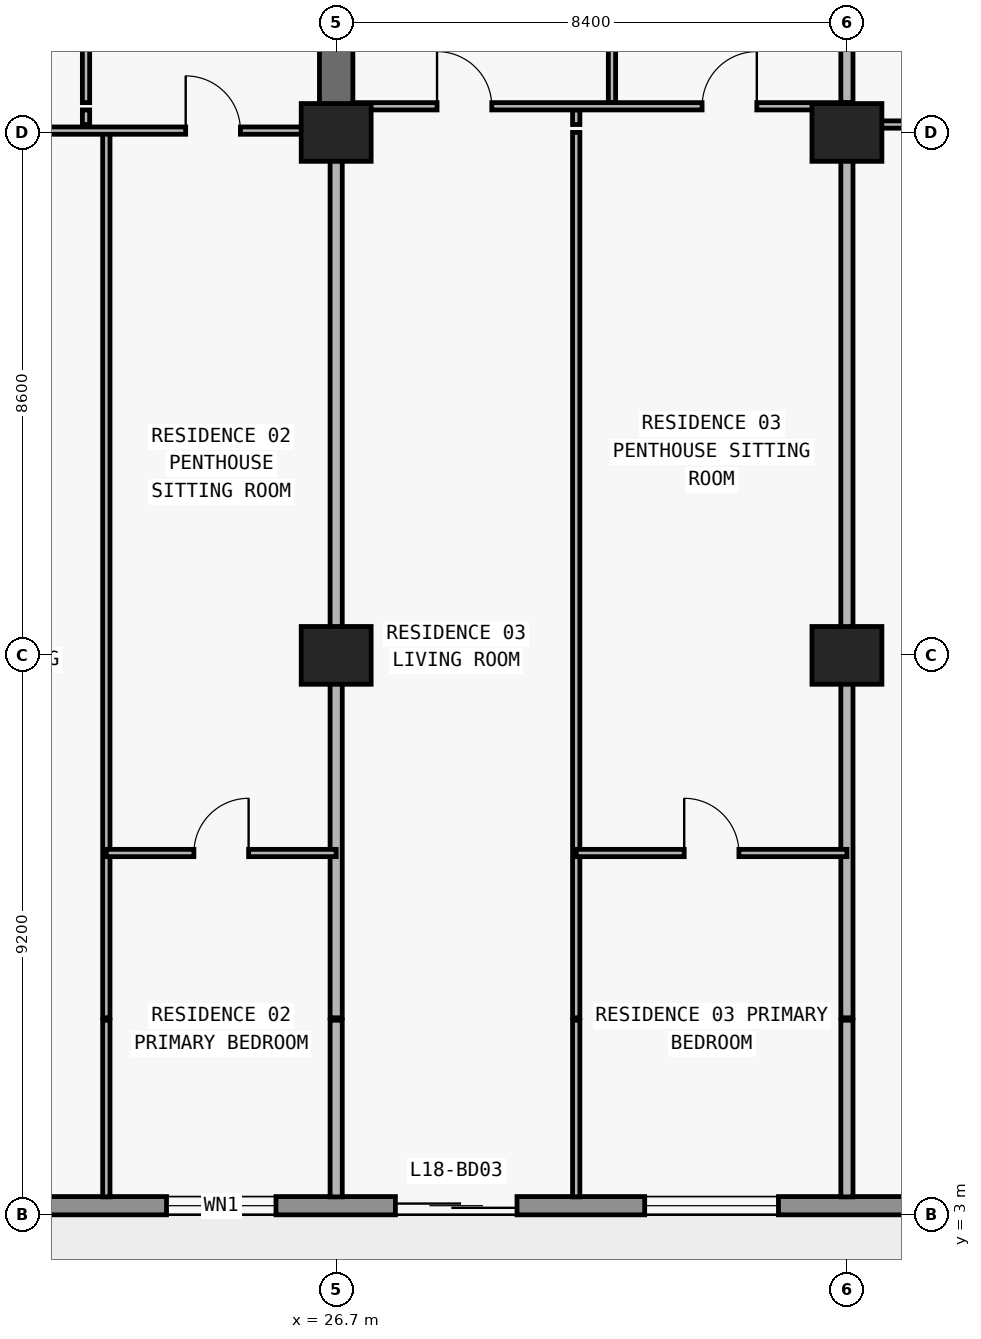
"""IFC4 building model, lengths in metres.
Left out: names, types, materials, properties, quantities, classifications, styles, units other than length and angle.
Written with IfcOpenShell. Run it as: python <this file> out.ifc"""

import sys

from ifc_helpers import new_model, si_unit, direction, frame, frame_2d, origin, origin_2d, place, context, subcontext, project, spatial, rectangle, extrude, element, fill, save


model = new_model("IFC4")
c1 = context("Model", 3, precision=1e-05, world=origin(), true_north=direction((0.0, 1.0)))
c2 = subcontext(c1, "Body", "Model", "MODEL_VIEW")
j1 = project(units=[si_unit("LENGTHUNIT", "METRE"), si_unit("PLANEANGLEUNIT", "RADIAN")], contexts=[c1])
p1 = place(None, origin())
s1 = spatial("IfcSite", under=j1, at=p1, CompositionType="ELEMENT")
p2 = place(p1, origin())
s2 = spatial("IfcBuilding", under=s1, at=p2, CompositionType="ELEMENT")
p3 = place(p2, frame((0.0, 0.0, 69.6)))
s3 = spatial("IfcBuildingStorey", under=s2, at=p3, CompositionType="ELEMENT", Elevation=69.6)
for number, where, z_axis, x_axis in (
    (1, (26.7, 12.2, 0.0), (0.0, 0.0, 1.0), (1.0, 0.0, 0.0)),
    (2, (35.1, 12.2, 0.0), (0.0, 0.0, 1.0), (1.0, 0.0, 0.0)),
    (3, (26.7, 20.8, 0.0), (0.0, 0.0, 1.0), (1.0, 0.0, 0.0)),
    (4, (35.1, 20.8, 0.0), (0.0, 0.0, 1.0), (1.0, 0.0, 0.0)),
):
    element("IfcColumn", number, at=place(p3, frame(where, z_axis=z_axis, x_axis=x_axis)), inside=s3, PredefinedType="COLUMN", context=c2, shape_type="SweptSolid", body=[
        extrude(rectangle(XDim=1.15, YDim=0.95, at=origin_2d()), origin(), (0.0, 0.0, 1.0), 3.05),
    ])
p4 = place(p3, frame((26.7, 20.8, 0.0), z_axis=(0.0, 0.0, 1.0), x_axis=(0.0, 1.0, 0.0)))
e5 = element("IfcWall", 5, at=p4, inside=s3, PredefinedType="SHEAR", context=c2, shape_type="SweptSolid", body=[
    extrude(rectangle(XDim=8.6, YDim=0.55, at=frame_2d((4.3, 0.0))), origin(), (0.0, 0.0, 1.0), 3.05),
])
p5 = place(p3, frame((72.7, 3.15, 0.0), z_axis=(0.0, 0.0, 1.0), x_axis=(-1.0, 0.0, 0.0)))
e6 = element("IfcWall", 6, at=p5, inside=s3, PredefinedType="STANDARD", context=c2, shape_type="SweptSolid", body=[
    extrude(rectangle(XDim=67.6, YDim=0.3, at=frame_2d((33.8, 0.0))), origin(), (0.0, 0.0, 1.0), 3.05),
])
p6 = place(p5, frame((59.826, 0.0, 0.0)))
e7 = element("IfcOpeningElement", 7, at=p6, cuts=e6, PredefinedType="OPENING", context=c2, shape_type="SweptSolid", body=[
    extrude(rectangle(XDim=2.0, YDim=2.3, at=frame_2d((1.0, 1.15))), frame((0.0, 0.16, 0.0), z_axis=(0.0, -1.0, 0.0), x_axis=(1.0, 0.0, 0.0)), (0.0, 0.0, 1.0), 0.32),
])
p7 = place(p5, frame((55.526, 0.0, 0.85)))
e8 = element("IfcOpeningElement", 8, at=p7, cuts=e6, PredefinedType="OPENING", context=c2, shape_type="SweptSolid", body=[
    extrude(rectangle(XDim=2.2, YDim=1.55, at=frame_2d((1.1, 0.775))), frame((0.0, 0.16, 0.0), z_axis=(0.0, -1.0, 0.0), x_axis=(1.0, 0.0, 0.0)), (0.0, 0.0, 1.0), 0.32),
])
p8 = place(p5, frame((51.09, 0.0, 0.0)))
e9 = element("IfcOpeningElement", 9, at=p8, cuts=e6, PredefinedType="OPENING", context=c2, shape_type="SweptSolid", body=[
    extrude(rectangle(XDim=2.0, YDim=2.3, at=frame_2d((1.0, 1.15))), frame((0.0, 0.16, 0.0), z_axis=(0.0, -1.0, 0.0), x_axis=(1.0, 0.0, 0.0)), (0.0, 0.0, 1.0), 0.32),
])
p9 = place(p5, frame((46.99, 0.0, 0.85)))
e10 = element("IfcOpeningElement", 10, at=p9, cuts=e6, PredefinedType="OPENING", context=c2, shape_type="SweptSolid", body=[
    extrude(rectangle(XDim=1.8, YDim=1.55, at=frame_2d((0.9, 0.775))), frame((0.0, 0.16, 0.0), z_axis=(0.0, -1.0, 0.0), x_axis=(1.0, 0.0, 0.0)), (0.0, 0.0, 1.0), 0.32),
])
p10 = place(p5, frame((43.026, 0.0, 0.0)))
e11 = element("IfcOpeningElement", 11, at=p10, cuts=e6, PredefinedType="OPENING", context=c2, shape_type="SweptSolid", body=[
    extrude(rectangle(XDim=2.0, YDim=2.3, at=frame_2d((1.0, 1.15))), frame((0.0, 0.16, 0.0), z_axis=(0.0, -1.0, 0.0), x_axis=(1.0, 0.0, 0.0)), (0.0, 0.0, 1.0), 0.32),
])
p11 = place(p5, frame((38.726, 0.0, 0.85)))
e12 = element("IfcOpeningElement", 12, at=p11, cuts=e6, PredefinedType="OPENING", context=c2, shape_type="SweptSolid", body=[
    extrude(rectangle(XDim=2.2, YDim=1.55, at=frame_2d((1.1, 0.775))), frame((0.0, 0.16, 0.0), z_axis=(0.0, -1.0, 0.0), x_axis=(1.0, 0.0, 0.0)), (0.0, 0.0, 1.0), 0.32),
])
p12 = place(p5, frame((34.51, 0.0, 0.0)))
e13 = element("IfcOpeningElement", 13, at=p12, cuts=e6, PredefinedType="OPENING", context=c2, shape_type="SweptSolid", body=[
    extrude(rectangle(XDim=2.0, YDim=2.3, at=frame_2d((1.0, 1.15))), frame((0.0, 0.16, 0.0), z_axis=(0.0, -1.0, 0.0), x_axis=(1.0, 0.0, 0.0)), (0.0, 0.0, 1.0), 0.32),
])
p13 = place(p5, frame((30.81, 0.0, 0.85)))
e14 = element("IfcOpeningElement", 14, at=p13, cuts=e6, PredefinedType="OPENING", context=c2, shape_type="SweptSolid", body=[
    extrude(rectangle(XDim=1.8, YDim=1.55, at=frame_2d((0.9, 0.775))), frame((0.0, 0.16, 0.0), z_axis=(0.0, -1.0, 0.0), x_axis=(1.0, 0.0, 0.0)), (0.0, 0.0, 1.0), 0.32),
])
p14 = place(p5, frame((27.026, 0.0, 0.0)))
e15 = element("IfcOpeningElement", 15, at=p14, cuts=e6, PredefinedType="OPENING", context=c2, shape_type="SweptSolid", body=[
    extrude(rectangle(XDim=2.0, YDim=2.3, at=frame_2d((1.0, 1.15))), frame((0.0, 0.16, 0.0), z_axis=(0.0, -1.0, 0.0), x_axis=(1.0, 0.0, 0.0)), (0.0, 0.0, 1.0), 0.32),
])
p15 = place(p5, frame((22.726, 0.0, 0.85)))
e16 = element("IfcOpeningElement", 16, at=p15, cuts=e6, PredefinedType="OPENING", context=c2, shape_type="SweptSolid", body=[
    extrude(rectangle(XDim=2.2, YDim=1.55, at=frame_2d((1.1, 0.775))), frame((0.0, 0.16, 0.0), z_axis=(0.0, -1.0, 0.0), x_axis=(1.0, 0.0, 0.0)), (0.0, 0.0, 1.0), 0.32),
])
p16 = place(p5, frame((18.29, 0.0, 0.0)))
e17 = element("IfcOpeningElement", 17, at=p16, cuts=e6, PredefinedType="OPENING", context=c2, shape_type="SweptSolid", body=[
    extrude(rectangle(XDim=2.0, YDim=2.3, at=frame_2d((1.0, 1.15))), frame((0.0, 0.16, 0.0), z_axis=(0.0, -1.0, 0.0), x_axis=(1.0, 0.0, 0.0)), (0.0, 0.0, 1.0), 0.32),
])
p17 = place(p5, frame((14.19, 0.0, 0.85)))
e18 = element("IfcOpeningElement", 18, at=p17, cuts=e6, PredefinedType="OPENING", context=c2, shape_type="SweptSolid", body=[
    extrude(rectangle(XDim=1.8, YDim=1.55, at=frame_2d((0.9, 0.775))), frame((0.0, 0.16, 0.0), z_axis=(0.0, -1.0, 0.0), x_axis=(1.0, 0.0, 0.0)), (0.0, 0.0, 1.0), 0.32),
])
p18 = place(p5, frame((10.226, 0.0, 0.0)))
e19 = element("IfcOpeningElement", 19, at=p18, cuts=e6, PredefinedType="OPENING", context=c2, shape_type="SweptSolid", body=[
    extrude(rectangle(XDim=2.0, YDim=2.3, at=frame_2d((1.0, 1.15))), frame((0.0, 0.16, 0.0), z_axis=(0.0, -1.0, 0.0), x_axis=(1.0, 0.0, 0.0)), (0.0, 0.0, 1.0), 0.32),
])
p19 = place(p5, frame((5.926, 0.0, 0.85)))
e20 = element("IfcOpeningElement", 20, at=p19, cuts=e6, PredefinedType="OPENING", context=c2, shape_type="SweptSolid", body=[
    extrude(rectangle(XDim=2.2, YDim=1.55, at=frame_2d((1.1, 0.775))), frame((0.0, 0.16, 0.0), z_axis=(0.0, -1.0, 0.0), x_axis=(1.0, 0.0, 0.0)), (0.0, 0.0, 1.0), 0.32),
])
p20 = place(p3, frame((22.586, 20.93, 0.0), z_axis=(0.0, 0.0, 1.0), x_axis=(0.0, 1.0, 0.0)))
e21 = element("IfcWall", 21, at=p20, inside=s3, PredefinedType="PARTITIONING", context=c2, shape_type="SweptSolid", body=[
    extrude(rectangle(XDim=0.24, YDim=0.12, at=frame_2d((0.12, 0.0))), origin(), (0.0, 0.0, 1.0), 3.05),
])
p21 = place(p3, frame((22.586, 21.29, 0.0), z_axis=(0.0, 0.0, 1.0), x_axis=(0.0, 1.0, 0.0)))
e22 = element("IfcWall", 22, at=p21, inside=s3, PredefinedType="PARTITIONING", context=c2, shape_type="SweptSolid", body=[
    extrude(rectangle(XDim=4.69, YDim=0.12, at=frame_2d((2.345, 0.0))), origin(), (0.0, 0.0, 1.0), 3.05),
])
p22 = place(p21, frame((1.895, 0.0, 0.0)))
e23 = element("IfcOpeningElement", 23, at=p22, cuts=e22, PredefinedType="OPENING", context=c2, shape_type="SweptSolid", body=[
    extrude(rectangle(XDim=0.9, YDim=2.15, at=frame_2d((0.45, 1.075))), frame((0.0, 0.07, 0.0), z_axis=(0.0, -1.0, 0.0), x_axis=(1.0, 0.0, 0.0)), (0.0, 0.0, 1.0), 0.14),
])
p23 = place(p3, frame((22.92, 3.295, 0.0), z_axis=(0.0, 0.0, 1.0), x_axis=(0.0, 1.0, 0.0)))
e24 = element("IfcWall", 24, at=p23, inside=s3, PredefinedType="PARTITIONING", context=c2, shape_type="SweptSolid", body=[
    extrude(rectangle(XDim=2.905, YDim=0.12, at=frame_2d((1.453, 0.0))), origin(), (0.0, 0.0, 1.0), 3.05),
])
p24 = place(p3, frame((22.92, 6.24, 0.0), z_axis=(0.0, 0.0, 1.0), x_axis=(0.0, 1.0, 0.0)))
e25 = element("IfcWall", 25, at=p24, inside=s3, PredefinedType="PARTITIONING", context=c2, shape_type="SweptSolid", body=[
    extrude(rectangle(XDim=14.56, YDim=0.12, at=frame_2d((7.28, 0.0))), origin(), (0.0, 0.0, 1.0), 3.05),
])
p25 = place(p3, frame((26.7, 3.295, 0.0), z_axis=(0.0, 0.0, 1.0), x_axis=(0.0, 1.0, 0.0)))
e26 = element("IfcWall", 26, at=p25, inside=s3, PredefinedType="PARTITIONING", context=c2, shape_type="SweptSolid", body=[
    extrude(rectangle(XDim=2.905, YDim=0.2, at=frame_2d((1.453, 0.0))), origin(), (0.0, 0.0, 1.0), 3.05),
])
p26 = place(p3, frame((26.7, 6.24, 0.0), z_axis=(0.0, 0.0, 1.0), x_axis=(0.0, 1.0, 0.0)))
e27 = element("IfcWall", 27, at=p26, inside=s3, PredefinedType="PARTITIONING", context=c2, shape_type="SweptSolid", body=[
    extrude(rectangle(XDim=14.555, YDim=0.2, at=frame_2d((7.277, 0.0))), origin(), (0.0, 0.0, 1.0), 2.11),
])
p27 = place(p3, frame((30.648, 3.295, 0.0), z_axis=(0.0, 0.0, 1.0), x_axis=(0.0, 1.0, 0.0)))
e28 = element("IfcWall", 28, at=p27, inside=s3, PredefinedType="PARTITIONING", context=c2, shape_type="SweptSolid", body=[
    extrude(rectangle(XDim=2.905, YDim=0.12, at=frame_2d((1.453, 0.0))), origin(), (0.0, 0.0, 1.0), 3.05),
])
p28 = place(p3, frame((30.648, 6.24, 0.0), z_axis=(0.0, 0.0, 1.0), x_axis=(0.0, 1.0, 0.0)))
e29 = element("IfcWall", 29, at=p28, inside=s3, PredefinedType="PARTITIONING", context=c2, shape_type="SweptSolid", body=[
    extrude(rectangle(XDim=14.56, YDim=0.12, at=frame_2d((7.28, 0.0))), origin(), (0.0, 0.0, 1.0), 3.05),
])
p29 = place(p3, frame((30.648, 20.93, 0.0), z_axis=(0.0, 0.0, 1.0), x_axis=(0.0, 1.0, 0.0)))
e30 = element("IfcWall", 30, at=p29, inside=s3, PredefinedType="PARTITIONING", context=c2, shape_type="SweptSolid", body=[
    extrude(rectangle(XDim=0.24, YDim=0.12, at=frame_2d((0.12, 0.0))), origin(), (0.0, 0.0, 1.0), 3.05),
])
p30 = place(p3, frame((31.236, 21.29, 0.0), z_axis=(0.0, 0.0, 1.0), x_axis=(0.0, 1.0, 0.0)))
e31 = element("IfcWall", 31, at=p30, inside=s3, PredefinedType="PARTITIONING", context=c2, shape_type="SweptSolid", body=[
    extrude(rectangle(XDim=4.69, YDim=0.12, at=frame_2d((2.345, 0.0))), origin(), (0.0, 0.0, 1.0), 3.05),
])
p31 = place(p30, frame((1.895, 0.0, 0.0)))
e32 = element("IfcOpeningElement", 32, at=p31, cuts=e31, PredefinedType="OPENING", context=c2, shape_type="SweptSolid", body=[
    extrude(rectangle(XDim=0.9, YDim=2.15, at=frame_2d((0.45, 1.075))), frame((0.0, 0.07, 0.0), z_axis=(0.0, -1.0, 0.0), x_axis=(1.0, 0.0, 0.0)), (0.0, 0.0, 1.0), 0.14),
])
p32 = place(p3, frame((35.1, 3.295, 0.0), z_axis=(0.0, 0.0, 1.0), x_axis=(0.0, 1.0, 0.0)))
e33 = element("IfcWall", 33, at=p32, inside=s3, PredefinedType="PARTITIONING", context=c2, shape_type="SweptSolid", body=[
    extrude(rectangle(XDim=2.905, YDim=0.2, at=frame_2d((1.453, 0.0))), origin(), (0.0, 0.0, 1.0), 3.05),
])
p33 = place(p3, frame((35.1, 6.24, 0.0), z_axis=(0.0, 0.0, 1.0), x_axis=(0.0, 1.0, 0.0)))
e34 = element("IfcWall", 34, at=p33, inside=s3, PredefinedType="PARTITIONING", context=c2, shape_type="SweptSolid", body=[
    extrude(rectangle(XDim=14.56, YDim=0.2, at=frame_2d((7.28, 0.0))), origin(), (0.0, 0.0, 1.0), 2.11),
])
p34 = place(p3, frame((35.1, 20.93, 0.0), z_axis=(0.0, 0.0, 1.0), x_axis=(0.0, 1.0, 0.0)))
e35 = element("IfcWall", 35, at=p34, inside=s3, PredefinedType="PARTITIONING", context=c2, shape_type="SweptSolid", body=[
    extrude(rectangle(XDim=0.24, YDim=0.2, at=frame_2d((0.12, 0.0))), origin(), (0.0, 0.0, 1.0), 3.05),
])
p35 = place(p3, frame((35.1, 21.29, 0.0), z_axis=(0.0, 0.0, 1.0), x_axis=(0.0, 1.0, 0.0)))
e36 = element("IfcWall", 36, at=p35, inside=s3, PredefinedType="PARTITIONING", context=c2, shape_type="SweptSolid", body=[
    extrude(rectangle(XDim=4.69, YDim=0.2, at=frame_2d((2.345, 0.0))), origin(), (0.0, 0.0, 1.0), 2.11),
])
p36 = place(p3, frame((22.92, 8.95, 0.0), z_axis=(0.0, 0.0, 1.0), x_axis=(1.0, 0.0, 0.0)))
e37 = element("IfcWall", 37, at=p36, inside=s3, PredefinedType="PARTITIONING", context=c2, shape_type="SweptSolid", body=[
    extrude(rectangle(XDim=3.78, YDim=0.12, at=frame_2d((1.89, 0.0))), origin(), (0.0, 0.0, 1.0), 3.05),
])
p37 = place(p36, frame((1.44, 0.0, 0.0)))
e38 = element("IfcOpeningElement", 38, at=p37, cuts=e37, PredefinedType="OPENING", context=c2, shape_type="SweptSolid", body=[
    extrude(rectangle(XDim=0.9, YDim=2.15, at=frame_2d((0.45, 1.075))), frame((0.0, 0.07, 0.0), z_axis=(0.0, -1.0, 0.0), x_axis=(1.0, 0.0, 0.0)), (0.0, 0.0, 1.0), 0.14),
])
p38 = place(p3, frame((30.648, 8.95, 0.0), z_axis=(0.0, 0.0, 1.0), x_axis=(1.0, 0.0, 0.0)))
e39 = element("IfcWall", 39, at=p38, inside=s3, PredefinedType="PARTITIONING", context=c2, shape_type="SweptSolid", body=[
    extrude(rectangle(XDim=4.452, YDim=0.12, at=frame_2d((2.226, 0.0))), origin(), (0.0, 0.0, 1.0), 3.05),
])
p39 = place(p38, frame((1.776, 0.0, 0.0)))
e40 = element("IfcOpeningElement", 40, at=p39, cuts=e39, PredefinedType="OPENING", context=c2, shape_type="SweptSolid", body=[
    extrude(rectangle(XDim=0.9, YDim=2.15, at=frame_2d((0.45, 1.075))), frame((0.0, 0.07, 0.0), z_axis=(0.0, -1.0, 0.0), x_axis=(1.0, 0.0, 0.0)), (0.0, 0.0, 1.0), 0.14),
])
p40 = place(p3, frame((18.3, 20.83, 0.0), z_axis=(0.0, 0.0, 1.0), x_axis=(1.0, 0.0, 0.0)))
e41 = element("IfcWall", 41, at=p40, inside=s3, PredefinedType="PARTITIONING", context=c2, shape_type="SweptSolid", body=[
    extrude(rectangle(XDim=8.13, YDim=0.12, at=frame_2d((4.065, 0.0))), origin(), (0.0, 0.0, 1.0), 2.11),
])
p41 = place(p40, frame((1.693, 0.0, 0.0)))
e42 = element("IfcOpeningElement", 42, at=p41, cuts=e41, PredefinedType="OPENING", context=c2, shape_type="SweptSolid", body=[
    extrude(rectangle(XDim=0.9, YDim=2.06, at=frame_2d((0.45, 1.03))), frame((0.0, 0.07, 0.0), z_axis=(0.0, -1.0, 0.0), x_axis=(1.0, 0.0, 0.0)), (0.0, 0.0, 1.0), 0.14),
])
p42 = place(p40, frame((5.925, 0.0, 0.0)))
e43 = element("IfcOpeningElement", 43, at=p42, cuts=e41, PredefinedType="OPENING", context=c2, shape_type="SweptSolid", body=[
    extrude(rectangle(XDim=0.9, YDim=2.06, at=frame_2d((0.45, 1.03))), frame((0.0, 0.07, 0.0), z_axis=(0.0, -1.0, 0.0), x_axis=(1.0, 0.0, 0.0)), (0.0, 0.0, 1.0), 0.14),
])
p43 = place(p3, frame((35.1, 20.93, 0.0), z_axis=(0.0, 0.0, 1.0), x_axis=(1.0, 0.0, 0.0)))
e44 = element("IfcWall", 44, at=p43, inside=s3, PredefinedType="PARTITIONING", context=c2, shape_type="SweptSolid", body=[
    extrude(rectangle(XDim=7.6, YDim=0.12, at=frame_2d((3.8, 0.0))), origin(), (0.0, 0.0, 1.0), 2.11),
])
p44 = place(p43, frame((1.64, 0.0, 0.0)))
e45 = element("IfcOpeningElement", 45, at=p44, cuts=e44, PredefinedType="OPENING", context=c2, shape_type="SweptSolid", body=[
    extrude(rectangle(XDim=0.9, YDim=2.06, at=frame_2d((0.45, 1.03))), frame((0.0, 0.07, 0.0), z_axis=(0.0, -1.0, 0.0), x_axis=(1.0, 0.0, 0.0)), (0.0, 0.0, 1.0), 0.14),
])
p45 = place(p43, frame((5.527, 0.0, 0.0)))
e46 = element("IfcOpeningElement", 46, at=p45, cuts=e44, PredefinedType="OPENING", context=c2, shape_type="SweptSolid", body=[
    extrude(rectangle(XDim=0.9, YDim=2.06, at=frame_2d((0.45, 1.03))), frame((0.0, 0.07, 0.0), z_axis=(0.0, -1.0, 0.0), x_axis=(1.0, 0.0, 0.0)), (0.0, 0.0, 1.0), 0.14),
])
p46 = place(p3, frame((26.97, 21.23, 0.0), z_axis=(0.0, 0.0, 1.0), x_axis=(1.0, 0.0, 0.0)))
e47 = element("IfcWall", 47, at=p46, inside=s3, PredefinedType="PARTITIONING", context=c2, shape_type="SweptSolid", body=[
    extrude(rectangle(XDim=8.13, YDim=0.12, at=frame_2d((4.065, 0.0))), origin(), (0.0, 0.0, 1.0), 3.05),
])
p47 = place(p46, frame((1.389, 0.0, 0.0)))
e48 = element("IfcOpeningElement", 48, at=p47, cuts=e47, PredefinedType="OPENING", context=c2, shape_type="SweptSolid", body=[
    extrude(rectangle(XDim=0.9, YDim=2.15, at=frame_2d((0.45, 1.075))), frame((0.0, 0.07, 0.0), z_axis=(0.0, -1.0, 0.0), x_axis=(1.0, 0.0, 0.0)), (0.0, 0.0, 1.0), 0.14),
])
p48 = place(p46, frame((5.748, 0.0, 0.0)))
e49 = element("IfcOpeningElement", 49, at=p48, cuts=e47, PredefinedType="OPENING", context=c2, shape_type="SweptSolid", body=[
    extrude(rectangle(XDim=0.9, YDim=2.15, at=frame_2d((0.45, 1.075))), frame((0.0, 0.07, 0.0), z_axis=(0.0, -1.0, 0.0), x_axis=(1.0, 0.0, 0.0)), (0.0, 0.0, 1.0), 0.14),
])
p49 = place(p9, origin())
e50 = element("IfcWindow", 50, at=p49, inside=s3, PartitioningType="SINGLE_PANEL", PredefinedType="WINDOW", context=c2, shape_type="SweptSolid", body=[
    extrude(rectangle(XDim=1.8, YDim=1.55, at=frame_2d((0.9, 0.775))), frame((0.0, 0.03, 0.0), z_axis=(0.0, -1.0, 0.0), x_axis=(1.0, 0.0, 0.0)), (0.0, 0.0, 1.0), 0.06),
])
fill(e10, e50)
p50 = place(p10, origin())
e51 = element("IfcDoor", 51, at=p50, inside=s3, OperationType="DOUBLE_DOOR_SLIDING", PredefinedType="DOOR", context=c2, shape_type="SweptSolid", body=[
    extrude(rectangle(XDim=2.0, YDim=2.3, at=frame_2d((1.0, 1.15))), frame((0.0, 0.025, 0.0), z_axis=(0.0, -1.0, 0.0), x_axis=(1.0, 0.0, 0.0)), (0.0, 0.0, 1.0), 0.05),
])
fill(e11, e51)
p51 = place(p11, origin())
e52 = element("IfcWindow", 52, at=p51, inside=s3, PartitioningType="SINGLE_PANEL", PredefinedType="WINDOW", context=c2, shape_type="SweptSolid", body=[
    extrude(rectangle(XDim=2.2, YDim=1.55, at=frame_2d((1.1, 0.775))), frame((0.0, 0.03, 0.0), z_axis=(0.0, -1.0, 0.0), x_axis=(1.0, 0.0, 0.0)), (0.0, 0.0, 1.0), 0.06),
])
fill(e12, e52)
p52 = place(p42, origin())
e53 = element("IfcDoor", 53, at=p52, inside=s3, OperationType="SINGLE_SWING_LEFT", PredefinedType="DOOR", context=c2, shape_type="SweptSolid", body=[
    extrude(rectangle(XDim=0.9, YDim=2.06, at=frame_2d((0.45, 1.03))), frame((0.0, 0.025, 0.0), z_axis=(0.0, -1.0, 0.0), x_axis=(1.0, 0.0, 0.0)), (0.0, 0.0, 1.0), 0.05),
])
fill(e43, e53)
p53 = place(p37, origin())
e54 = element("IfcDoor", 54, at=p53, inside=s3, OperationType="SINGLE_SWING_RIGHT", PredefinedType="DOOR", context=c2, shape_type="SweptSolid", body=[
    extrude(rectangle(XDim=0.9, YDim=2.15, at=frame_2d((0.45, 1.075))), frame((0.0, 0.025, 0.0), z_axis=(0.0, -1.0, 0.0), x_axis=(1.0, 0.0, 0.0)), (0.0, 0.0, 1.0), 0.05),
])
fill(e38, e54)
p54 = place(p47, origin())
e55 = element("IfcDoor", 55, at=p54, inside=s3, OperationType="SINGLE_SWING_LEFT", PredefinedType="DOOR", context=c2, shape_type="SweptSolid", body=[
    extrude(rectangle(XDim=0.9, YDim=2.15, at=frame_2d((0.45, 1.075))), frame((0.0, 0.025, 0.0), z_axis=(0.0, -1.0, 0.0), x_axis=(1.0, 0.0, 0.0)), (0.0, 0.0, 1.0), 0.05),
])
fill(e48, e55)
p55 = place(p48, origin())
e56 = element("IfcDoor", 56, at=p55, inside=s3, OperationType="SINGLE_SWING_RIGHT", PredefinedType="DOOR", context=c2, shape_type="SweptSolid", body=[
    extrude(rectangle(XDim=0.9, YDim=2.15, at=frame_2d((0.45, 1.075))), frame((0.0, 0.025, 0.0), z_axis=(0.0, -1.0, 0.0), x_axis=(1.0, 0.0, 0.0)), (0.0, 0.0, 1.0), 0.05),
])
fill(e49, e56)
p56 = place(p39, origin())
e57 = element("IfcDoor", 57, at=p56, inside=s3, OperationType="SINGLE_SWING_LEFT", PredefinedType="DOOR", context=c2, shape_type="SweptSolid", body=[
    extrude(rectangle(XDim=0.9, YDim=2.15, at=frame_2d((0.45, 1.075))), frame((0.0, 0.025, 0.0), z_axis=(0.0, -1.0, 0.0), x_axis=(1.0, 0.0, 0.0)), (0.0, 0.0, 1.0), 0.05),
])
fill(e40, e57)
save(model, sys.argv[1])
